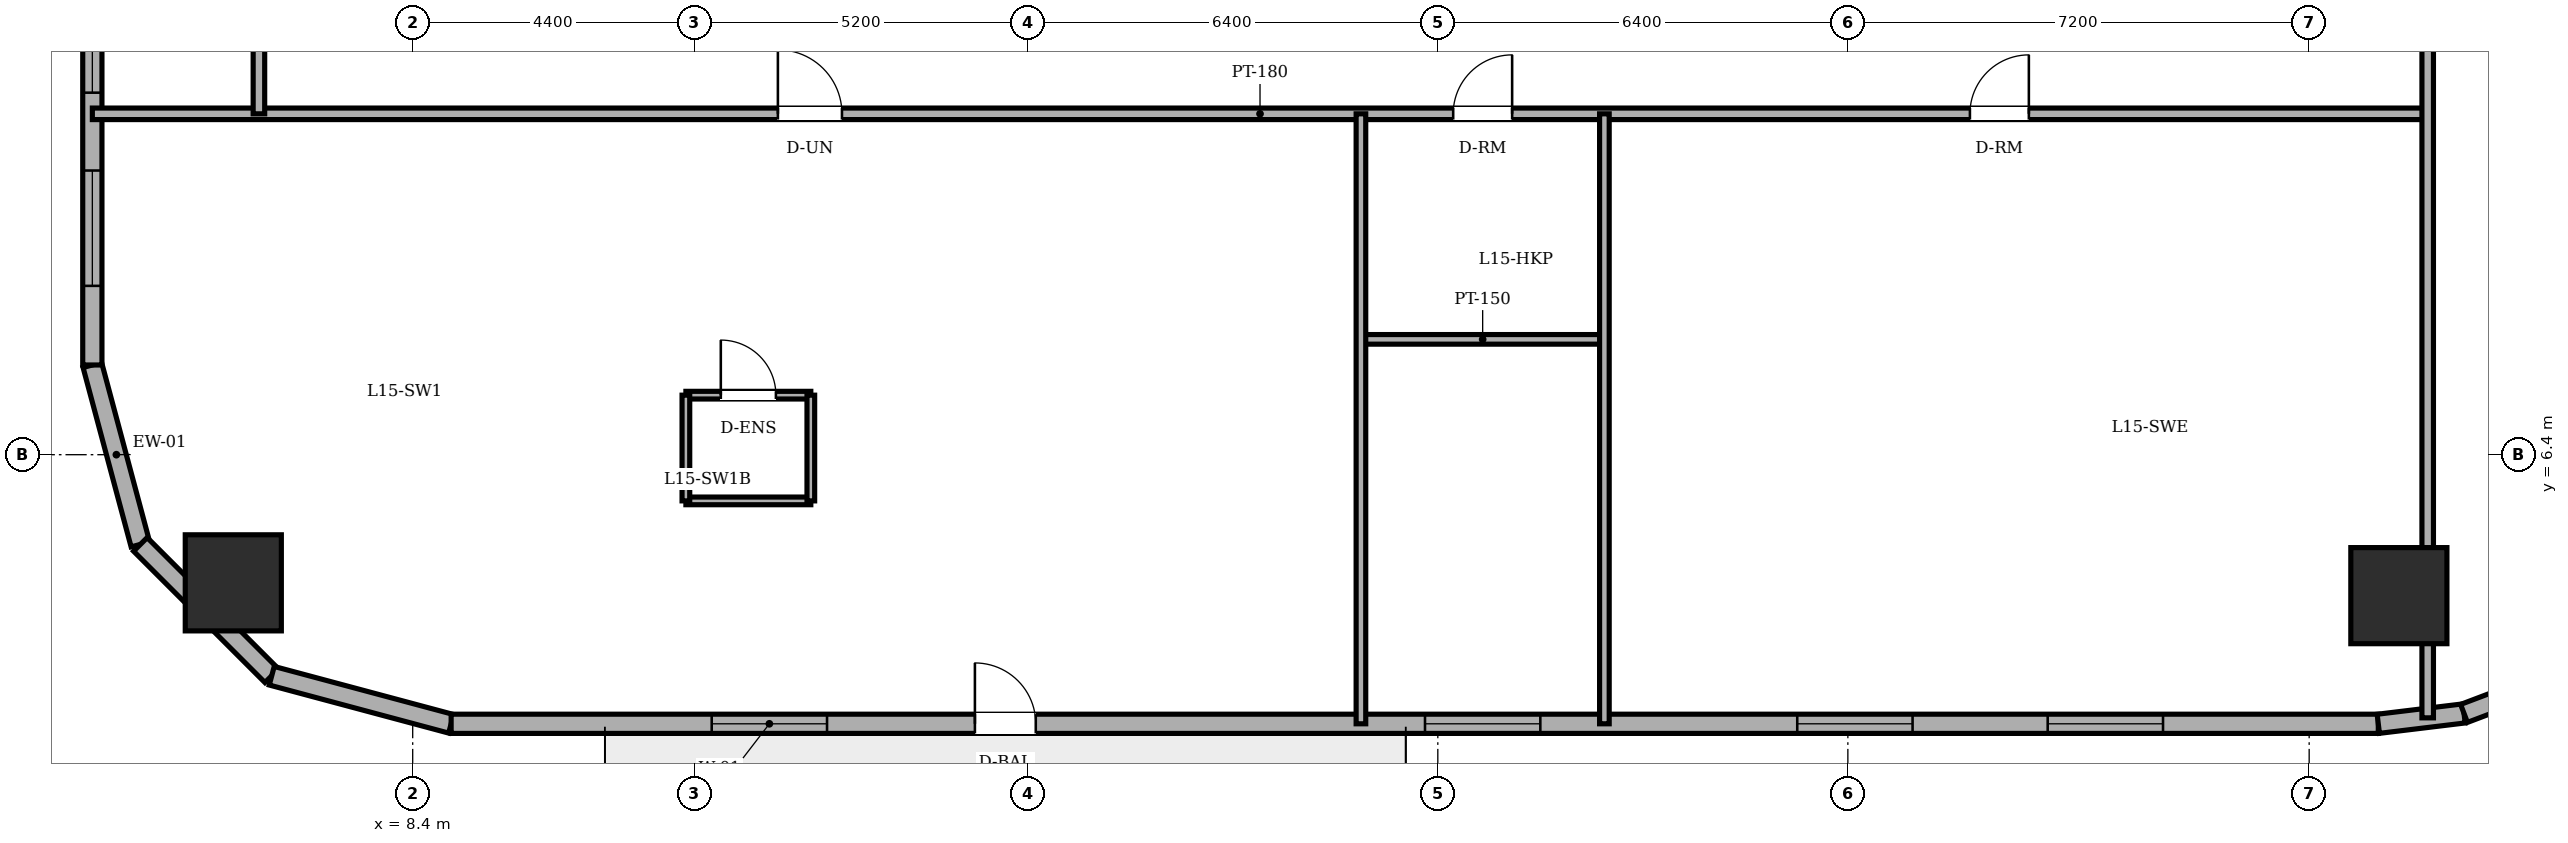
"""IFC4 building model, lengths in metres.
Left out: names, types, materials, properties, quantities, classifications, styles, units other than length and angle.
Written with IfcOpenShell. Run it as: python <this file> out.ifc"""

import sys

from ifc_helpers import new_model, si_unit, direction, frame, frame_2d, origin, origin_2d, place, context, subcontext, project, spatial, rectangle, circle, extrude, element, fill, save


model = new_model("IFC4")
c1 = context("Model", 3, precision=1e-05, world=origin(), true_north=direction((0.0, 1.0)))
c2 = subcontext(c1, "Body", "Model", "MODEL_VIEW")
j1 = project(units=[si_unit("LENGTHUNIT", "METRE"), si_unit("PLANEANGLEUNIT", "RADIAN")], contexts=[c1])
p1 = place(None, origin())
s1 = spatial("IfcSite", under=j1, at=p1, CompositionType="ELEMENT")
p2 = place(p1, origin())
s2 = spatial("IfcBuilding", under=s1, at=p2, CompositionType="ELEMENT")
p3 = place(p2, frame((0.0, 0.0, 57.6)))
s3 = spatial("IfcBuildingStorey", under=s2, at=p3, CompositionType="ELEMENT", Elevation=57.6)
for number, where, z_axis, x_axis in (
    (1, (5.6, 4.4, 0.0), (0.0, 0.0, 1.0), (1.0, 0.0, 0.0)),
    (2, (39.4, 4.2, 0.0), (0.0, 0.0, 1.0), (1.0, 0.0, 0.0)),
):
    element("IfcColumn", number, at=place(p3, frame(where, z_axis=z_axis, x_axis=x_axis)), inside=s3, PredefinedType="COLUMN", context=c2, shape_type="SweptSolid", body=[
        extrude(circle(Radius=0.75, at=origin_2d()), origin(), (0.0, 0.0, 1.0), 3.6),
    ])
p4 = place(p3, frame((3.4, 7.8, 0.0), z_axis=(0.0, 0.0, 1.0), x_axis=(0.258731875344, -0.96594917914, 0.0)))
e3 = element("IfcWall", 3, at=p4, inside=s3, PredefinedType="SOLIDWALL", context=c2, shape_type="SweptSolid", body=[
    extrude(rectangle(XDim=2.899, YDim=0.3, at=frame_2d((1.449, 0.0))), origin(), (0.0, 0.0, 1.0), 3.4),
])
p5 = place(p3, frame((4.15, 5.0, 0.0), z_axis=(0.0, 0.0, 1.0), x_axis=(0.707106781187, -0.707106781187, 0.0)))
e4 = element("IfcWall", 4, at=p5, inside=s3, PredefinedType="SOLIDWALL", context=c2, shape_type="SweptSolid", body=[
    extrude(rectangle(XDim=2.899, YDim=0.3, at=frame_2d((1.45, 0.0))), origin(), (0.0, 0.0, 1.0), 3.4),
])
p6 = place(p3, frame((6.2, 2.95, 0.0), z_axis=(0.0, 0.0, 1.0), x_axis=(0.96594917914, -0.258731875344, 0.0)))
e5 = element("IfcWall", 5, at=p6, inside=s3, PredefinedType="SOLIDWALL", context=c2, shape_type="SweptSolid", body=[
    extrude(rectangle(XDim=2.899, YDim=0.3, at=frame_2d((1.449, 0.0))), origin(), (0.0, 0.0, 1.0), 3.4),
])
p7 = place(p3, frame((9.0, 2.2, 0.0), z_axis=(0.0, 0.0, 1.0), x_axis=(1.0, 0.0, 0.0)))
e6 = element("IfcWall", 6, at=p7, inside=s3, PredefinedType="SOLIDWALL", context=c2, shape_type="SweptSolid", body=[
    extrude(rectangle(XDim=30.079, YDim=0.3, at=frame_2d((15.04, 0.0))), origin(), (0.0, 0.0, 1.0), 3.4),
])
p8 = place(p7, frame((8.175, 0.0, 0.0)))
e7 = element("IfcOpeningElement", 7, at=p8, cuts=e6, PredefinedType="OPENING", context=c2, shape_type="SweptSolid", body=[
    extrude(rectangle(XDim=0.95, YDim=2.2, at=frame_2d((0.475, 1.1))), frame((0.0, 0.16, 0.0), z_axis=(0.0, -1.0, 0.0), x_axis=(1.0, 0.0, 0.0)), (0.0, 0.0, 1.0), 0.32),
])
p9 = place(p7, frame((4.067, 0.0, 0.85)))
e8 = element("IfcOpeningElement", 8, at=p9, cuts=e6, PredefinedType="OPENING", context=c2, shape_type="SweptSolid", body=[
    extrude(rectangle(XDim=1.8, YDim=1.55, at=frame_2d((0.9, 0.775))), frame((0.0, 0.16, 0.0), z_axis=(0.0, -1.0, 0.0), x_axis=(1.0, 0.0, 0.0)), (0.0, 0.0, 1.0), 0.32),
])
p10 = place(p7, frame((15.2, 0.0, 0.85)))
e9 = element("IfcOpeningElement", 9, at=p10, cuts=e6, PredefinedType="OPENING", context=c2, shape_type="SweptSolid", body=[
    extrude(rectangle(XDim=1.8, YDim=1.55, at=frame_2d((0.9, 0.775))), frame((0.0, 0.16, 0.0), z_axis=(0.0, -1.0, 0.0), x_axis=(1.0, 0.0, 0.0)), (0.0, 0.0, 1.0), 0.32),
])
p11 = place(p7, frame((21.01, 0.0, 0.85)))
e10 = element("IfcOpeningElement", 10, at=p11, cuts=e6, PredefinedType="OPENING", context=c2, shape_type="SweptSolid", body=[
    extrude(rectangle(XDim=1.8, YDim=1.55, at=frame_2d((0.9, 0.775))), frame((0.0, 0.16, 0.0), z_axis=(0.0, -1.0, 0.0), x_axis=(1.0, 0.0, 0.0)), (0.0, 0.0, 1.0), 0.32),
])
p12 = place(p7, frame((24.919, 0.0, 0.85)))
e11 = element("IfcOpeningElement", 11, at=p12, cuts=e6, PredefinedType="OPENING", context=c2, shape_type="SweptSolid", body=[
    extrude(rectangle(XDim=1.8, YDim=1.55, at=frame_2d((0.9, 0.775))), frame((0.0, 0.16, 0.0), z_axis=(0.0, -1.0, 0.0), x_axis=(1.0, 0.0, 0.0)), (0.0, 0.0, 1.0), 0.32),
])
p13 = place(p3, frame((39.079, 2.2, 0.0), z_axis=(0.0, 0.0, 1.0), x_axis=(0.992739027259, 0.120288086515, 0.0)))
e12 = element("IfcWall", 12, at=p13, inside=s3, PredefinedType="SOLIDWALL", context=c2, shape_type="SweptSolid", body=[
    extrude(rectangle(XDim=1.348, YDim=0.3, at=frame_2d((0.674, 0.0))), origin(), (0.0, 0.0, 1.0), 3.4),
])
p14 = place(p3, frame((40.417, 2.362, 0.0), z_axis=(0.0, 0.0, 1.0), x_axis=(0.935156721165, 0.354234254216, 0.0)))
e13 = element("IfcWall", 13, at=p14, inside=s3, PredefinedType="SOLIDWALL", context=c2, shape_type="SweptSolid", body=[
    extrude(rectangle(XDim=1.349, YDim=0.3, at=frame_2d((0.675, 0.0))), origin(), (0.0, 0.0, 1.0), 3.4),
])
p15 = place(p3, frame((3.4, 40.2, 0.0), z_axis=(0.0, 0.0, 1.0), x_axis=(0.0, -1.0, 0.0)))
e14 = element("IfcWall", 14, at=p15, inside=s3, PredefinedType="SOLIDWALL", context=c2, shape_type="SweptSolid", body=[
    extrude(rectangle(XDim=32.4, YDim=0.3, at=frame_2d((16.2, 0.0))), origin(), (0.0, 0.0, 1.0), 3.4),
])
p16 = place(p15, frame((1.235, 0.0, 0.85)))
e15 = element("IfcOpeningElement", 15, at=p16, cuts=e14, PredefinedType="OPENING", context=c2, shape_type="SweptSolid", body=[
    extrude(rectangle(XDim=1.8, YDim=1.55, at=frame_2d((0.9, 0.775))), frame((0.0, 0.16, 0.0), z_axis=(0.0, -1.0, 0.0), x_axis=(1.0, 0.0, 0.0)), (0.0, 0.0, 1.0), 0.32),
])
p17 = place(p15, frame((4.25, 0.0, 0.85)))
e16 = element("IfcOpeningElement", 16, at=p17, cuts=e14, PredefinedType="OPENING", context=c2, shape_type="SweptSolid", body=[
    extrude(rectangle(XDim=1.8, YDim=1.55, at=frame_2d((0.9, 0.775))), frame((0.0, 0.16, 0.0), z_axis=(0.0, -1.0, 0.0), x_axis=(1.0, 0.0, 0.0)), (0.0, 0.0, 1.0), 0.32),
])
p18 = place(p15, frame((9.253, 0.0, 0.85)))
e17 = element("IfcOpeningElement", 17, at=p18, cuts=e14, PredefinedType="OPENING", context=c2, shape_type="SweptSolid", body=[
    extrude(rectangle(XDim=1.8, YDim=1.55, at=frame_2d((0.9, 0.775))), frame((0.0, 0.16, 0.0), z_axis=(0.0, -1.0, 0.0), x_axis=(1.0, 0.0, 0.0)), (0.0, 0.0, 1.0), 0.32),
])
p19 = place(p15, frame((13.027, 0.0, 0.85)))
e18 = element("IfcOpeningElement", 18, at=p19, cuts=e14, PredefinedType="OPENING", context=c2, shape_type="SweptSolid", body=[
    extrude(rectangle(XDim=1.8, YDim=1.55, at=frame_2d((0.9, 0.775))), frame((0.0, 0.16, 0.0), z_axis=(0.0, -1.0, 0.0), x_axis=(1.0, 0.0, 0.0)), (0.0, 0.0, 1.0), 0.32),
])
p20 = place(p15, frame((19.573, 0.0, 0.85)))
e19 = element("IfcOpeningElement", 19, at=p20, cuts=e14, PredefinedType="OPENING", context=c2, shape_type="SweptSolid", body=[
    extrude(rectangle(XDim=1.8, YDim=1.55, at=frame_2d((0.9, 0.775))), frame((0.0, 0.16, 0.0), z_axis=(0.0, -1.0, 0.0), x_axis=(1.0, 0.0, 0.0)), (0.0, 0.0, 1.0), 0.32),
])
p21 = place(p15, frame((22.347, 0.0, 0.85)))
e20 = element("IfcOpeningElement", 20, at=p21, cuts=e14, PredefinedType="OPENING", context=c2, shape_type="SweptSolid", body=[
    extrude(rectangle(XDim=1.8, YDim=1.55, at=frame_2d((0.9, 0.775))), frame((0.0, 0.16, 0.0), z_axis=(0.0, -1.0, 0.0), x_axis=(1.0, 0.0, 0.0)), (0.0, 0.0, 1.0), 0.32),
])
p22 = place(p15, frame((26.35, 0.0, 0.85)))
e21 = element("IfcOpeningElement", 21, at=p22, cuts=e14, PredefinedType="OPENING", context=c2, shape_type="SweptSolid", body=[
    extrude(rectangle(XDim=1.8, YDim=1.55, at=frame_2d((0.9, 0.775))), frame((0.0, 0.16, 0.0), z_axis=(0.0, -1.0, 0.0), x_axis=(1.0, 0.0, 0.0)), (0.0, 0.0, 1.0), 0.32),
])
p23 = place(p15, frame((29.365, 0.0, 0.85)))
e22 = element("IfcOpeningElement", 22, at=p23, cuts=e14, PredefinedType="OPENING", context=c2, shape_type="SweptSolid", body=[
    extrude(rectangle(XDim=1.8, YDim=1.55, at=frame_2d((0.9, 0.775))), frame((0.0, 0.16, 0.0), z_axis=(0.0, -1.0, 0.0), x_axis=(1.0, 0.0, 0.0)), (0.0, 0.0, 1.0), 0.32),
])
p24 = place(p3, frame((12.664, 7.329, 0.0), z_axis=(0.0, 0.0, 1.0), x_axis=(1.0, 0.0, 0.0)))
e23 = element("IfcWall", 23, at=p24, inside=s3, PredefinedType="PARTITIONING", context=c2, shape_type="SweptSolid", body=[
    extrude(rectangle(XDim=1.95, YDim=0.12, at=frame_2d((0.975, 0.0))), origin(), (0.0, 0.0, 1.0), 3.4),
])
p25 = place(p24, frame((0.545, 0.0, 0.0)))
e24 = element("IfcOpeningElement", 24, at=p25, cuts=e23, PredefinedType="OPENING", context=c2, shape_type="SweptSolid", body=[
    extrude(rectangle(XDim=0.86, YDim=2.1, at=frame_2d((0.43, 1.05))), frame((0.0, 0.07, 0.0), z_axis=(0.0, -1.0, 0.0), x_axis=(1.0, 0.0, 0.0)), (0.0, 0.0, 1.0), 0.14),
])
p26 = place(p3, frame((14.614, 5.679, 0.0), z_axis=(0.0, 0.0, 1.0), x_axis=(-1.0, 0.0, 0.0)))
e25 = element("IfcWall", 25, at=p26, inside=s3, PredefinedType="PARTITIONING", context=c2, shape_type="SweptSolid", body=[
    extrude(rectangle(XDim=1.95, YDim=0.12, at=frame_2d((0.975, 0.0))), origin(), (0.0, 0.0, 1.0), 3.4),
])
for number, where, z_axis, x_axis in (
    (26, (12.664, 7.329, 0.0), (0.0, 0.0, 1.0), (0.0, -1.0, 0.0)),
    (27, (14.614, 5.679, 0.0), (0.0, 0.0, 1.0), (0.0, 1.0, 0.0)),
):
    element("IfcWall", number, at=place(p3, frame(where, z_axis=z_axis, x_axis=x_axis)), inside=s3, PredefinedType="PARTITIONING", context=c2, shape_type="SweptSolid", body=[
        extrude(rectangle(XDim=1.65, YDim=0.12, at=frame_2d((0.825, 0.0))), origin(), (0.0, 0.0, 1.0), 3.4),
    ])
p27 = place(p3, frame((23.2, 8.2, 0.0), z_axis=(0.0, 0.0, 1.0), x_axis=(1.0, 0.0, 0.0)))
e28 = element("IfcWall", 28, at=p27, inside=s3, PredefinedType="PARTITIONING", context=c2, shape_type="SweptSolid", body=[
    extrude(rectangle(XDim=3.8, YDim=0.15, at=frame_2d((1.9, 0.0))), origin(), (0.0, 0.0, 1.0), 3.4),
])
p28 = place(p3, frame((3.4, 11.72, 0.0), z_axis=(0.0, 0.0, 1.0), x_axis=(1.0, 0.0, 0.0)))
e29 = element("IfcWall", 29, at=p28, inside=s3, PredefinedType="PARTITIONING", context=c2, shape_type="SweptSolid", body=[
    extrude(rectangle(XDim=36.45, YDim=0.18, at=frame_2d((18.225, 0.0))), origin(), (0.0, 0.0, 1.0), 3.4),
])
p29 = place(p28, frame((21.24, 0.0, 0.0)))
e30 = element("IfcOpeningElement", 30, at=p29, cuts=e29, PredefinedType="OPENING", context=c2, shape_type="SweptSolid", body=[
    extrude(rectangle(XDim=0.92, YDim=2.1, at=frame_2d((0.46, 1.05))), frame((0.0, 0.1, 0.0), z_axis=(0.0, -1.0, 0.0), x_axis=(1.0, 0.0, 0.0)), (0.0, 0.0, 1.0), 0.2),
])
p30 = place(p28, frame((10.7, 0.0, 0.0)))
e31 = element("IfcOpeningElement", 31, at=p30, cuts=e29, PredefinedType="OPENING", context=c2, shape_type="SweptSolid", body=[
    extrude(rectangle(XDim=1.0, YDim=2.15, at=frame_2d((0.5, 1.075))), frame((0.0, 0.1, 0.0), z_axis=(0.0, -1.0, 0.0), x_axis=(1.0, 0.0, 0.0)), (0.0, 0.0, 1.0), 0.2),
])
p31 = place(p28, frame((29.305, 0.0, 0.0)))
e32 = element("IfcOpeningElement", 32, at=p31, cuts=e29, PredefinedType="OPENING", context=c2, shape_type="SweptSolid", body=[
    extrude(rectangle(XDim=0.92, YDim=2.1, at=frame_2d((0.46, 1.05))), frame((0.0, 0.1, 0.0), z_axis=(0.0, -1.0, 0.0), x_axis=(1.0, 0.0, 0.0)), (0.0, 0.0, 1.0), 0.2),
])
p32 = place(p3, frame((6.0, 11.72, 0.0), z_axis=(0.0, 0.0, 1.0), x_axis=(0.0, 1.0, 0.0)))
e33 = element("IfcWall", 33, at=p32, inside=s3, PredefinedType="PARTITIONING", context=c2, shape_type="SweptSolid", body=[
    extrude(rectangle(XDim=2.46, YDim=0.18, at=frame_2d((1.23, 0.0))), origin(), (0.0, 0.0, 1.0), 3.4),
])
for number, where, z_axis, x_axis in (
    (34, (23.2, 2.2, 0.0), (0.0, 0.0, 1.0), (0.0, 1.0, 0.0)),
    (35, (27.0, 2.2, 0.0), (0.0, 0.0, 1.0), (0.0, 1.0, 0.0)),
):
    element("IfcWall", number, at=place(p3, frame(where, z_axis=z_axis, x_axis=x_axis)), inside=s3, PredefinedType="PARTITIONING", context=c2, shape_type="SweptSolid", body=[
        extrude(rectangle(XDim=9.52, YDim=0.15, at=frame_2d((4.76, 0.0))), origin(), (0.0, 0.0, 1.0), 3.4),
    ])
p33 = place(p3, frame((39.85, 2.293, 0.0), z_axis=(0.0, 0.0, 1.0), x_axis=(0.0, 1.0, 0.0)))
e36 = element("IfcWall", 36, at=p33, inside=s3, PredefinedType="PARTITIONING", context=c2, shape_type="SweptSolid", body=[
    extrude(rectangle(XDim=20.527, YDim=0.18, at=frame_2d((10.264, 0.0))), origin(), (0.0, 0.0, 1.0), 2.782),
])
p34 = place(p33, frame((14.257, 0.0, 0.0)))
e37 = element("IfcOpeningElement", 37, at=p34, cuts=e36, PredefinedType="OPENING", context=c2, shape_type="SweptSolid", body=[
    extrude(rectangle(XDim=0.92, YDim=2.1, at=frame_2d((0.46, 1.05))), frame((0.0, 0.1, 0.0), z_axis=(0.0, -1.0, 0.0), x_axis=(1.0, 0.0, 0.0)), (0.0, 0.0, 1.0), 0.2),
])
p35 = place(p8, origin())
e38 = element("IfcDoor", 38, at=p35, inside=s3, OperationType="SINGLE_SWING_LEFT", PredefinedType="DOOR", context=c2, shape_type="SweptSolid", body=[
    extrude(rectangle(XDim=0.95, YDim=2.2, at=frame_2d((0.475, 1.1))), frame((0.0, 0.025, 0.0), z_axis=(0.0, -1.0, 0.0), x_axis=(1.0, 0.0, 0.0)), (0.0, 0.0, 1.0), 0.05),
])
fill(e7, e38)
p36 = place(p9, origin())
e39 = element("IfcWindow", 39, at=p36, inside=s3, PartitioningType="DOUBLE_PANEL_VERTICAL", PredefinedType="WINDOW", context=c2, shape_type="SweptSolid", body=[
    extrude(rectangle(XDim=1.8, YDim=1.55, at=frame_2d((0.9, 0.775))), frame((0.0, 0.03, 0.0), z_axis=(0.0, -1.0, 0.0), x_axis=(1.0, 0.0, 0.0)), (0.0, 0.0, 1.0), 0.06),
])
fill(e8, e39)
p37 = place(p10, origin())
e40 = element("IfcWindow", 40, at=p37, inside=s3, PartitioningType="DOUBLE_PANEL_VERTICAL", PredefinedType="WINDOW", context=c2, shape_type="SweptSolid", body=[
    extrude(rectangle(XDim=1.8, YDim=1.55, at=frame_2d((0.9, 0.775))), frame((0.0, 0.03, 0.0), z_axis=(0.0, -1.0, 0.0), x_axis=(1.0, 0.0, 0.0)), (0.0, 0.0, 1.0), 0.06),
])
fill(e9, e40)
p38 = place(p11, origin())
e41 = element("IfcWindow", 41, at=p38, inside=s3, PartitioningType="DOUBLE_PANEL_VERTICAL", PredefinedType="WINDOW", context=c2, shape_type="SweptSolid", body=[
    extrude(rectangle(XDim=1.8, YDim=1.55, at=frame_2d((0.9, 0.775))), frame((0.0, 0.03, 0.0), z_axis=(0.0, -1.0, 0.0), x_axis=(1.0, 0.0, 0.0)), (0.0, 0.0, 1.0), 0.06),
])
fill(e10, e41)
p39 = place(p12, origin())
e42 = element("IfcWindow", 42, at=p39, inside=s3, PartitioningType="DOUBLE_PANEL_VERTICAL", PredefinedType="WINDOW", context=c2, shape_type="SweptSolid", body=[
    extrude(rectangle(XDim=1.8, YDim=1.55, at=frame_2d((0.9, 0.775))), frame((0.0, 0.03, 0.0), z_axis=(0.0, -1.0, 0.0), x_axis=(1.0, 0.0, 0.0)), (0.0, 0.0, 1.0), 0.06),
])
fill(e11, e42)
p40 = place(p22, origin())
e43 = element("IfcWindow", 43, at=p40, inside=s3, PartitioningType="DOUBLE_PANEL_VERTICAL", PredefinedType="WINDOW", context=c2, shape_type="SweptSolid", body=[
    extrude(rectangle(XDim=1.8, YDim=1.55, at=frame_2d((0.9, 0.775))), frame((0.0, 0.03, 0.0), z_axis=(0.0, -1.0, 0.0), x_axis=(1.0, 0.0, 0.0)), (0.0, 0.0, 1.0), 0.06),
])
fill(e21, e43)
p41 = place(p23, origin())
e44 = element("IfcWindow", 44, at=p41, inside=s3, PartitioningType="DOUBLE_PANEL_VERTICAL", PredefinedType="WINDOW", context=c2, shape_type="SweptSolid", body=[
    extrude(rectangle(XDim=1.8, YDim=1.55, at=frame_2d((0.9, 0.775))), frame((0.0, 0.03, 0.0), z_axis=(0.0, -1.0, 0.0), x_axis=(1.0, 0.0, 0.0)), (0.0, 0.0, 1.0), 0.06),
])
fill(e22, e44)
p42 = place(p25, origin())
e45 = element("IfcDoor", 45, at=p42, inside=s3, OperationType="SINGLE_SWING_LEFT", PredefinedType="DOOR", context=c2, shape_type="SweptSolid", body=[
    extrude(rectangle(XDim=0.86, YDim=2.1, at=frame_2d((0.43, 1.05))), frame((0.0, 0.025, 0.0), z_axis=(0.0, -1.0, 0.0), x_axis=(1.0, 0.0, 0.0)), (0.0, 0.0, 1.0), 0.05),
])
fill(e24, e45)
p43 = place(p29, origin())
e46 = element("IfcDoor", 46, at=p43, inside=s3, OperationType="SINGLE_SWING_RIGHT", PredefinedType="DOOR", context=c2, shape_type="SweptSolid", body=[
    extrude(rectangle(XDim=0.92, YDim=2.1, at=frame_2d((0.46, 1.05))), frame((0.0, 0.025, 0.0), z_axis=(0.0, -1.0, 0.0), x_axis=(1.0, 0.0, 0.0)), (0.0, 0.0, 1.0), 0.05),
])
fill(e30, e46)
p44 = place(p30, origin())
e47 = element("IfcDoor", 47, at=p44, inside=s3, OperationType="SINGLE_SWING_LEFT", PredefinedType="DOOR", context=c2, shape_type="SweptSolid", body=[
    extrude(rectangle(XDim=1.0, YDim=2.15, at=frame_2d((0.5, 1.075))), frame((0.0, 0.025, 0.0), z_axis=(0.0, -1.0, 0.0), x_axis=(1.0, 0.0, 0.0)), (0.0, 0.0, 1.0), 0.05),
])
fill(e31, e47)
p45 = place(p31, origin())
e48 = element("IfcDoor", 48, at=p45, inside=s3, OperationType="SINGLE_SWING_RIGHT", PredefinedType="DOOR", context=c2, shape_type="SweptSolid", body=[
    extrude(rectangle(XDim=0.92, YDim=2.1, at=frame_2d((0.46, 1.05))), frame((0.0, 0.025, 0.0), z_axis=(0.0, -1.0, 0.0), x_axis=(1.0, 0.0, 0.0)), (0.0, 0.0, 1.0), 0.05),
])
fill(e32, e48)
save(model, sys.argv[1])
